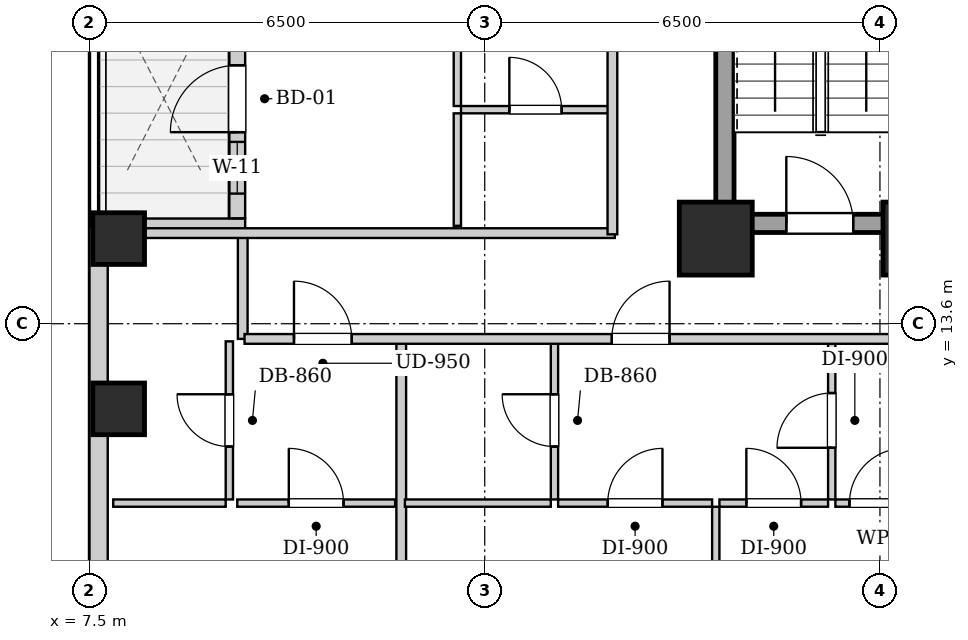
"""IFC4 building model, lengths in metres.
Left out: names, types, materials, properties, quantities, classifications, styles, units other than length and angle.
Written with IfcOpenShell. Run it as: python <this file> out.ifc"""

import sys

from ifc_helpers import new_model, si_unit, direction, frame, frame_2d, origin, origin_2d, place, context, subcontext, project, spatial, rectangle, extrude, element, fill, save


model = new_model("IFC4")
c1 = context("Model", 3, precision=1e-05, world=origin(), true_north=direction((0.0, 1.0)))
c2 = subcontext(c1, "Body", "Model", "MODEL_VIEW")
j1 = project(units=[si_unit("LENGTHUNIT", "METRE"), si_unit("PLANEANGLEUNIT", "RADIAN")], contexts=[c1])
p1 = place(None, origin())
s1 = spatial("IfcSite", under=j1, at=p1, CompositionType="ELEMENT")
p2 = place(p1, origin())
s2 = spatial("IfcBuilding", under=s1, at=p2, CompositionType="ELEMENT")
p3 = place(p2, frame((0.0, 0.0, 57.8)))
s3 = spatial("IfcBuildingStorey", under=s2, at=p3, CompositionType="ELEMENT", Elevation=57.8)
for number, where, z_axis, x_axis in (
    (1, (7.98, 12.2, 0.0), (0.0, 0.0, 1.0), (1.0, 0.0, 0.0)),
    (2, (7.98, 15.0, 0.0), (0.0, 0.0, 1.0), (1.0, 0.0, 0.0)),
):
    element("IfcColumn", number, at=place(p3, frame(where, z_axis=z_axis, x_axis=x_axis)), inside=s3, PredefinedType="COLUMN", context=c2, shape_type="SweptSolid", body=[
        extrude(rectangle(XDim=0.85, YDim=0.85, at=origin_2d()), origin(), (0.0, 0.0, 1.0), 3.2),
    ])
for number, where, z_axis, x_axis in (
    (3, (17.8, 15.0, 0.0), (0.0, 0.0, 1.0), (1.0, 0.0, 0.0)),
    (4, (21.15, 15.0, 0.0), (0.0, 0.0, 1.0), (1.0, 0.0, 0.0)),
):
    element("IfcColumn", number, at=place(p3, frame(where, z_axis=z_axis, x_axis=x_axis)), inside=s3, PredefinedType="COLUMN", context=c2, shape_type="SweptSolid", body=[
        extrude(rectangle(XDim=1.2, YDim=1.2, at=origin_2d()), origin(), (0.0, 0.0, 1.0), 3.2),
    ])
p4 = place(p3, frame((7.65, 2.5, 0.0), z_axis=(0.0, 0.0, 1.0), x_axis=(0.0, 1.0, 0.0)))
e5 = element("IfcWall", 5, at=p4, inside=s3, PredefinedType="SOLIDWALL", context=c2, shape_type="SweptSolid", body=[
    extrude(rectangle(XDim=12.7, YDim=0.3, at=frame_2d((6.35, 0.0))), origin(), (0.0, 0.0, 1.0), 1.975),
])
p5 = place(p4, frame((3.257, 0.0, 0.55)))
e6 = element("IfcOpeningElement", 6, at=p5, cuts=e5, PredefinedType="OPENING", context=c2, shape_type="SweptSolid", body=[
    extrude(rectangle(XDim=1.8, YDim=1.2, at=frame_2d((0.9, 0.6))), frame((0.0, 0.16, 0.0), z_axis=(0.0, -1.0, 0.0), x_axis=(1.0, 0.0, 0.0)), (0.0, 0.0, 1.0), 0.32),
])
p6 = place(p4, frame((1.185, 0.0, 0.55)))
e7 = element("IfcOpeningElement", 7, at=p6, cuts=e5, PredefinedType="OPENING", context=c2, shape_type="SweptSolid", body=[
    extrude(rectangle(XDim=1.35, YDim=1.2, at=frame_2d((0.675, 0.6))), frame((0.0, 0.16, 0.0), z_axis=(0.0, -1.0, 0.0), x_axis=(1.0, 0.0, 0.0)), (0.0, 0.0, 1.0), 0.32),
])
p7 = place(p3, frame((7.66, 15.2, 0.0), z_axis=(0.0, 0.0, 1.0), x_axis=(1.0, 0.0, 0.0)))
e8 = element("IfcWall", 8, at=p7, inside=s3, PredefinedType="SOLIDWALL", context=c2, shape_type="SweptSolid", body=[
    extrude(rectangle(XDim=2.4, YDim=0.26, at=frame_2d((1.2, 0.0))), origin(), (0.0, 0.0, 1.0), 2.94),
])
p8 = place(p3, frame((9.93, 15.334, 0.0), z_axis=(0.0, 0.0, 1.0), x_axis=(0.0, 1.0, 0.0)))
e9 = element("IfcWall", 9, at=p8, inside=s3, PredefinedType="SOLIDWALL", context=c2, shape_type="SweptSolid", body=[
    extrude(rectangle(XDim=3.932, YDim=0.26, at=frame_2d((1.966, 0.0))), origin(), (0.0, 0.0, 1.0), 2.94),
])
p9 = place(p8, frame((1.416, 0.0, 0.0)))
e10 = element("IfcOpeningElement", 10, at=p9, cuts=e9, PredefinedType="OPENING", context=c2, shape_type="SweptSolid", body=[
    extrude(rectangle(XDim=1.1, YDim=2.0, at=frame_2d((0.55, 1.0))), frame((0.0, 0.14, 0.0), z_axis=(0.0, -1.0, 0.0), x_axis=(1.0, 0.0, 0.0)), (0.0, 0.0, 1.0), 0.28),
])
p10 = place(p8, frame((0.406, 0.0, 0.55)))
e11 = element("IfcOpeningElement", 11, at=p10, cuts=e9, PredefinedType="OPENING", context=c2, shape_type="SweptSolid", body=[
    extrude(rectangle(XDim=0.85, YDim=1.2, at=frame_2d((0.425, 0.6))), frame((0.0, 0.14, 0.0), z_axis=(0.0, -1.0, 0.0), x_axis=(1.0, 0.0, 0.0)), (0.0, 0.0, 1.0), 0.28),
])
p11 = place(p3, frame((17.95, 15.1, 0.0), z_axis=(0.0, 0.0, 1.0), x_axis=(0.0, 1.0, 0.0)))
e12 = element("IfcWall", 12, at=p11, inside=s3, PredefinedType="SHEAR", context=c2, shape_type="SweptSolid", body=[
    extrude(rectangle(XDim=9.0, YDim=0.3, at=frame_2d((4.5, 0.0))), origin(), (0.0, 0.0, 1.0), 2.94),
])
p12 = place(p3, frame((18.1, 15.25, 0.0), z_axis=(0.0, 0.0, 1.0), x_axis=(1.0, 0.0, 0.0)))
e13 = element("IfcWall", 13, at=p12, inside=s3, PredefinedType="SHEAR", context=c2, shape_type="SweptSolid", body=[
    extrude(rectangle(XDim=2.85, YDim=0.3, at=frame_2d((1.425, 0.0))), origin(), (0.0, 0.0, 1.0), 2.94),
])
p13 = place(p12, frame((0.86, 0.0, 0.0)))
e14 = element("IfcOpeningElement", 14, at=p13, cuts=e13, PredefinedType="OPENING", context=c2, shape_type="SweptSolid", body=[
    extrude(rectangle(XDim=1.1, YDim=2.05, at=frame_2d((0.55, 1.025))), frame((0.0, 0.16, 0.0), z_axis=(0.0, -1.0, 0.0), x_axis=(1.0, 0.0, 0.0)), (0.0, 0.0, 1.0), 0.32),
])
p14 = place(p3, frame((10.02, 13.35, 0.0), z_axis=(0.0, 0.0, 1.0), x_axis=(0.0, 1.0, 0.0)))
e15 = element("IfcWall", 15, at=p14, inside=s3, PredefinedType="PARTITIONING", context=c2, shape_type="SweptSolid", body=[
    extrude(rectangle(XDim=1.74, YDim=0.16, at=frame_2d((0.87, 0.0))), origin(), (0.0, 0.0, 1.0), 2.94),
])
p15 = place(p3, frame((7.78, 15.09, 0.0), z_axis=(0.0, 0.0, 1.0), x_axis=(1.0, 0.0, 0.0)))
e16 = element("IfcWall", 16, at=p15, inside=s3, PredefinedType="PARTITIONING", context=c2, shape_type="SweptSolid", body=[
    extrude(rectangle(XDim=8.36, YDim=0.16, at=frame_2d((4.18, 0.0))), origin(), (0.0, 0.0, 1.0), 2.232),
])
p16 = place(p3, frame((9.8, 10.71, 0.0), z_axis=(0.0, 0.0, 1.0), x_axis=(0.0, 1.0, 0.0)))
e17 = element("IfcWall", 17, at=p16, inside=s3, PredefinedType="PARTITIONING", context=c2, shape_type="SweptSolid", body=[
    extrude(rectangle(XDim=2.6, YDim=0.12, at=frame_2d((1.3, 0.0))), origin(), (0.0, 0.0, 1.0), 2.94),
])
p17 = place(p16, frame((0.87, 0.0, 0.0)))
e18 = element("IfcOpeningElement", 18, at=p17, cuts=e17, PredefinedType="OPENING", context=c2, shape_type="SweptSolid", body=[
    extrude(rectangle(XDim=0.86, YDim=2.05, at=frame_2d((0.43, 1.025))), frame((0.0, 0.07, 0.0), z_axis=(0.0, -1.0, 0.0), x_axis=(1.0, 0.0, 0.0)), (0.0, 0.0, 1.0), 0.14),
])
p18 = place(p3, frame((7.89, 10.65, 0.0), z_axis=(0.0, 0.0, 1.0), x_axis=(1.0, 0.0, 0.0)))
e19 = element("IfcWall", 19, at=p18, inside=s3, PredefinedType="PARTITIONING", context=c2, shape_type="SweptSolid", body=[
    extrude(rectangle(XDim=1.85, YDim=0.12, at=frame_2d((0.925, 0.0))), origin(), (0.0, 0.0, 1.0), 2.94),
])
p19 = place(p3, frame((9.93, 10.65, 0.0), z_axis=(0.0, 0.0, 1.0), x_axis=(1.0, 0.0, 0.0)))
e20 = element("IfcWall", 20, at=p19, inside=s3, PredefinedType="PARTITIONING", context=c2, shape_type="SweptSolid", body=[
    extrude(rectangle(XDim=2.597, YDim=0.12, at=frame_2d((1.299, 0.0))), origin(), (0.0, 0.0, 1.0), 2.94),
])
p20 = place(p19, frame((0.848, 0.0, 0.0)))
e21 = element("IfcOpeningElement", 21, at=p20, cuts=e20, PredefinedType="OPENING", context=c2, shape_type="SweptSolid", body=[
    extrude(rectangle(XDim=0.9, YDim=2.05, at=frame_2d((0.45, 1.025))), frame((0.0, 0.07, 0.0), z_axis=(0.0, -1.0, 0.0), x_axis=(1.0, 0.0, 0.0)), (0.0, 0.0, 1.0), 0.14),
])
p21 = place(p3, frame((12.627, 2.26, 0.0), z_axis=(0.0, 0.0, 1.0), x_axis=(0.0, 1.0, 0.0)))
e22 = element("IfcWall", 22, at=p21, inside=s3, PredefinedType="PARTITIONING", context=c2, shape_type="SweptSolid", body=[
    extrude(rectangle(XDim=11.05, YDim=0.16, at=frame_2d((5.525, 0.0))), origin(), (0.0, 0.0, 1.0), 2.94),
])
p22 = place(p3, frame((15.147, 10.71, 0.0), z_axis=(0.0, 0.0, 1.0), x_axis=(0.0, 1.0, 0.0)))
e23 = element("IfcWall", 23, at=p22, inside=s3, PredefinedType="PARTITIONING", context=c2, shape_type="SweptSolid", body=[
    extrude(rectangle(XDim=2.6, YDim=0.12, at=frame_2d((1.3, 0.0))), origin(), (0.0, 0.0, 1.0), 2.94),
])
p23 = place(p22, frame((0.87, 0.0, 0.0)))
e24 = element("IfcOpeningElement", 24, at=p23, cuts=e23, PredefinedType="OPENING", context=c2, shape_type="SweptSolid", body=[
    extrude(rectangle(XDim=0.86, YDim=2.05, at=frame_2d((0.43, 1.025))), frame((0.0, 0.07, 0.0), z_axis=(0.0, -1.0, 0.0), x_axis=(1.0, 0.0, 0.0)), (0.0, 0.0, 1.0), 0.14),
])
p24 = place(p3, frame((12.687, 10.65, 0.0), z_axis=(0.0, 0.0, 1.0), x_axis=(1.0, 0.0, 0.0)))
e25 = element("IfcWall", 25, at=p24, inside=s3, PredefinedType="PARTITIONING", context=c2, shape_type="SweptSolid", body=[
    extrude(rectangle(XDim=2.4, YDim=0.12, at=frame_2d((1.2, 0.0))), origin(), (0.0, 0.0, 1.0), 2.94),
])
p25 = place(p3, frame((19.707, 10.71, 0.0), z_axis=(0.0, 0.0, 1.0), x_axis=(0.0, 1.0, 0.0)))
e26 = element("IfcWall", 26, at=p25, inside=s3, PredefinedType="PARTITIONING", context=c2, shape_type="SweptSolid", body=[
    extrude(rectangle(XDim=2.6, YDim=0.12, at=frame_2d((1.3, 0.0))), origin(), (0.0, 0.0, 1.0), 2.94),
])
p26 = place(p25, frame((0.85, 0.0, 0.0)))
e27 = element("IfcOpeningElement", 27, at=p26, cuts=e26, PredefinedType="OPENING", context=c2, shape_type="SweptSolid", body=[
    extrude(rectangle(XDim=0.9, YDim=2.05, at=frame_2d((0.45, 1.025))), frame((0.0, 0.07, 0.0), z_axis=(0.0, -1.0, 0.0), x_axis=(1.0, 0.0, 0.0)), (0.0, 0.0, 1.0), 0.14),
])
p27 = place(p3, frame((15.207, 10.65, 0.0), z_axis=(0.0, 0.0, 1.0), x_axis=(1.0, 0.0, 0.0)))
e28 = element("IfcWall", 28, at=p27, inside=s3, PredefinedType="PARTITIONING", context=c2, shape_type="SweptSolid", body=[
    extrude(rectangle(XDim=2.533, YDim=0.12, at=frame_2d((1.267, 0.0))), origin(), (0.0, 0.0, 1.0), 2.94),
])
p28 = place(p27, frame((0.816, 0.0, 0.0)))
e29 = element("IfcOpeningElement", 29, at=p28, cuts=e28, PredefinedType="OPENING", context=c2, shape_type="SweptSolid", body=[
    extrude(rectangle(XDim=0.9, YDim=2.05, at=frame_2d((0.45, 1.025))), frame((0.0, 0.07, 0.0), z_axis=(0.0, -1.0, 0.0), x_axis=(1.0, 0.0, 0.0)), (0.0, 0.0, 1.0), 0.14),
])
p29 = place(p3, frame((17.86, 10.65, 0.0), z_axis=(0.0, 0.0, 1.0), x_axis=(1.0, 0.0, 0.0)))
e30 = element("IfcWall", 30, at=p29, inside=s3, PredefinedType="PARTITIONING", context=c2, shape_type="SweptSolid", body=[
    extrude(rectangle(XDim=1.787, YDim=0.12, at=frame_2d((0.894, 0.0))), origin(), (0.0, 0.0, 1.0), 2.94),
])
p30 = place(p29, frame((0.443, 0.0, 0.0)))
e31 = element("IfcOpeningElement", 31, at=p30, cuts=e30, PredefinedType="OPENING", context=c2, shape_type="SweptSolid", body=[
    extrude(rectangle(XDim=0.9, YDim=2.05, at=frame_2d((0.45, 1.025))), frame((0.0, 0.07, 0.0), z_axis=(0.0, -1.0, 0.0), x_axis=(1.0, 0.0, 0.0)), (0.0, 0.0, 1.0), 0.14),
])
p31 = place(p3, frame((19.767, 10.65, 0.0), z_axis=(0.0, 0.0, 1.0), x_axis=(1.0, 0.0, 0.0)))
e32 = element("IfcWall", 32, at=p31, inside=s3, PredefinedType="PARTITIONING", context=c2, shape_type="SweptSolid", body=[
    extrude(rectangle(XDim=1.364, YDim=0.12, at=frame_2d((0.682, 0.0))), origin(), (0.0, 0.0, 1.0), 2.94),
])
p32 = place(p31, frame((0.232, 0.0, 0.0)))
e33 = element("IfcOpeningElement", 33, at=p32, cuts=e32, PredefinedType="OPENING", context=c2, shape_type="SweptSolid", body=[
    extrude(rectangle(XDim=0.9, YDim=2.05, at=frame_2d((0.45, 1.025))), frame((0.0, 0.07, 0.0), z_axis=(0.0, -1.0, 0.0), x_axis=(1.0, 0.0, 0.0)), (0.0, 0.0, 1.0), 0.14),
])
p33 = place(p3, frame((17.8, 0.28, 0.0), z_axis=(0.0, 0.0, 1.0), x_axis=(0.0, 1.0, 0.0)))
e34 = element("IfcWall", 34, at=p33, inside=s3, PredefinedType="PARTITIONING", context=c2, shape_type="SweptSolid", body=[
    extrude(rectangle(XDim=10.31, YDim=0.12, at=frame_2d((5.155, 0.0))), origin(), (0.0, 0.0, 1.0), 2.232),
])
p34 = place(p33, frame((4.69, 0.0, 0.0)))
e35 = element("IfcOpeningElement", 35, at=p34, cuts=e34, PredefinedType="OPENING", context=c2, shape_type="SweptSolid", body=[
    extrude(rectangle(XDim=0.9, YDim=2.05, at=frame_2d((0.45, 1.025))), frame((0.0, 0.07, 0.0), z_axis=(0.0, -1.0, 0.0), x_axis=(1.0, 0.0, 0.0)), (0.0, 0.0, 1.0), 0.14),
])
p35 = place(p3, frame((13.61, 17.12, 0.0), z_axis=(0.0, 0.0, 1.0), x_axis=(1.0, 0.0, 0.0)))
e36 = element("IfcWall", 36, at=p35, inside=s3, PredefinedType="PARTITIONING", context=c2, shape_type="SweptSolid", body=[
    extrude(rectangle(XDim=2.45, YDim=0.12, at=frame_2d((1.225, 0.0))), origin(), (0.0, 0.0, 1.0), 2.94),
])
p36 = place(p35, frame((0.795, 0.0, 0.0)))
e37 = element("IfcOpeningElement", 37, at=p36, cuts=e36, PredefinedType="OPENING", context=c2, shape_type="SweptSolid", body=[
    extrude(rectangle(XDim=0.86, YDim=2.05, at=frame_2d((0.43, 1.025))), frame((0.0, 0.07, 0.0), z_axis=(0.0, -1.0, 0.0), x_axis=(1.0, 0.0, 0.0)), (0.0, 0.0, 1.0), 0.14),
])
p37 = place(p3, frame((13.55, 15.21, 0.0), z_axis=(0.0, 0.0, 1.0), x_axis=(0.0, 1.0, 0.0)))
e38 = element("IfcWall", 38, at=p37, inside=s3, PredefinedType="PARTITIONING", context=c2, shape_type="SweptSolid", body=[
    extrude(rectangle(XDim=1.85, YDim=0.12, at=frame_2d((0.925, 0.0))), origin(), (0.0, 0.0, 1.0), 2.94),
])
p38 = place(p3, frame((13.55, 17.18, 0.0), z_axis=(0.0, 0.0, 1.0), x_axis=(0.0, 1.0, 0.0)))
e39 = element("IfcWall", 39, at=p38, inside=s3, PredefinedType="PARTITIONING", context=c2, shape_type="SweptSolid", body=[
    extrude(rectangle(XDim=3.946, YDim=0.12, at=frame_2d((1.973, 0.0))), origin(), (0.0, 0.0, 1.0), 2.94),
])
p39 = place(p38, frame((1.523, 0.0, 0.0)))
e40 = element("IfcOpeningElement", 40, at=p39, cuts=e39, PredefinedType="OPENING", context=c2, shape_type="SweptSolid", body=[
    extrude(rectangle(XDim=0.9, YDim=2.05, at=frame_2d((0.45, 1.025))), frame((0.0, 0.07, 0.0), z_axis=(0.0, -1.0, 0.0), x_axis=(1.0, 0.0, 0.0)), (0.0, 0.0, 1.0), 0.14),
])
p40 = place(p3, frame((10.05, 13.35, 0.0), z_axis=(0.0, 0.0, 1.0), x_axis=(1.0, 0.0, 0.0)))
e41 = element("IfcWall", 41, at=p40, inside=s3, PredefinedType="PARTITIONING", context=c2, shape_type="SweptSolid", body=[
    extrude(rectangle(XDim=33.9, YDim=0.16, at=frame_2d((16.95, 0.0))), origin(), (0.0, 0.0, 1.0), 2.94),
])
p41 = place(p40, frame((0.813, 0.0, 0.0)))
e42 = element("IfcOpeningElement", 42, at=p41, cuts=e41, PredefinedType="OPENING", context=c2, shape_type="SweptSolid", body=[
    extrude(rectangle(XDim=0.95, YDim=2.1, at=frame_2d((0.475, 1.05))), frame((0.0, 0.09, 0.0), z_axis=(0.0, -1.0, 0.0), x_axis=(1.0, 0.0, 0.0)), (0.0, 0.0, 1.0), 0.18),
])
p42 = place(p40, frame((6.04, 0.0, 0.0)))
e43 = element("IfcOpeningElement", 43, at=p42, cuts=e41, PredefinedType="OPENING", context=c2, shape_type="SweptSolid", body=[
    extrude(rectangle(XDim=0.95, YDim=2.1, at=frame_2d((0.475, 1.05))), frame((0.0, 0.09, 0.0), z_axis=(0.0, -1.0, 0.0), x_axis=(1.0, 0.0, 0.0)), (0.0, 0.0, 1.0), 0.18),
])
p43 = place(p40, frame((18.09, 0.0, 0.0)))
e44 = element("IfcOpeningElement", 44, at=p43, cuts=e41, PredefinedType="OPENING", context=c2, shape_type="SweptSolid", body=[
    extrude(rectangle(XDim=0.95, YDim=2.1, at=frame_2d((0.475, 1.05))), frame((0.0, 0.09, 0.0), z_axis=(0.0, -1.0, 0.0), x_axis=(1.0, 0.0, 0.0)), (0.0, 0.0, 1.0), 0.18),
])
p44 = place(p40, frame((25.962, 0.0, 0.0)))
e45 = element("IfcOpeningElement", 45, at=p44, cuts=e41, PredefinedType="OPENING", context=c2, shape_type="SweptSolid", body=[
    extrude(rectangle(XDim=0.95, YDim=2.1, at=frame_2d((0.475, 1.05))), frame((0.0, 0.09, 0.0), z_axis=(0.0, -1.0, 0.0), x_axis=(1.0, 0.0, 0.0)), (0.0, 0.0, 1.0), 0.18),
])
p45 = place(p3, frame((16.1, 15.07, 0.0), z_axis=(0.0, 0.0, 1.0), x_axis=(0.0, 1.0, 0.0)))
e46 = element("IfcWall", 46, at=p45, inside=s3, PredefinedType="PARTITIONING", context=c2, shape_type="SweptSolid", body=[
    extrude(rectangle(XDim=13.93, YDim=0.16, at=frame_2d((6.965, 0.0))), origin(), (0.0, 0.0, 1.0), 2.94),
])
p46 = place(p45, frame((3.608, 0.0, 0.0)))
e47 = element("IfcOpeningElement", 47, at=p46, cuts=e46, PredefinedType="OPENING", context=c2, shape_type="SweptSolid", body=[
    extrude(rectangle(XDim=0.95, YDim=2.1, at=frame_2d((0.475, 1.05))), frame((0.0, 0.09, 0.0), z_axis=(0.0, -1.0, 0.0), x_axis=(1.0, 0.0, 0.0)), (0.0, 0.0, 1.0), 0.18),
])
p47 = place(p45, frame((10.649, 0.0, 0.0)))
e48 = element("IfcOpeningElement", 48, at=p47, cuts=e46, PredefinedType="OPENING", context=c2, shape_type="SweptSolid", body=[
    extrude(rectangle(XDim=0.95, YDim=2.1, at=frame_2d((0.475, 1.05))), frame((0.0, 0.09, 0.0), z_axis=(0.0, -1.0, 0.0), x_axis=(1.0, 0.0, 0.0)), (0.0, 0.0, 1.0), 0.18),
])
p48 = place(p13, origin())
e49 = element("IfcDoor", 49, at=p48, inside=s3, OperationType="SINGLE_SWING_LEFT", PredefinedType="DOOR", context=c2, shape_type="SweptSolid", body=[
    extrude(rectangle(XDim=1.1, YDim=2.05, at=frame_2d((0.55, 1.025))), frame((0.0, 0.025, 0.0), z_axis=(0.0, -1.0, 0.0), x_axis=(1.0, 0.0, 0.0)), (0.0, 0.0, 1.0), 0.05),
])
fill(e14, e49)
p49 = place(p17, origin())
e50 = element("IfcDoor", 50, at=p49, inside=s3, OperationType="SINGLE_SWING_RIGHT", PredefinedType="DOOR", context=c2, shape_type="SweptSolid", body=[
    extrude(rectangle(XDim=0.86, YDim=2.05, at=frame_2d((0.43, 1.025))), frame((0.0, 0.025, 0.0), z_axis=(0.0, -1.0, 0.0), x_axis=(1.0, 0.0, 0.0)), (0.0, 0.0, 1.0), 0.05),
])
fill(e18, e50)
p50 = place(p20, origin())
e51 = element("IfcDoor", 51, at=p50, inside=s3, OperationType="SINGLE_SWING_LEFT", PredefinedType="DOOR", context=c2, shape_type="SweptSolid", body=[
    extrude(rectangle(XDim=0.9, YDim=2.05, at=frame_2d((0.45, 1.025))), frame((0.0, 0.025, 0.0), z_axis=(0.0, -1.0, 0.0), x_axis=(1.0, 0.0, 0.0)), (0.0, 0.0, 1.0), 0.05),
])
fill(e21, e51)
p51 = place(p23, origin())
e52 = element("IfcDoor", 52, at=p51, inside=s3, OperationType="SINGLE_SWING_RIGHT", PredefinedType="DOOR", context=c2, shape_type="SweptSolid", body=[
    extrude(rectangle(XDim=0.86, YDim=2.05, at=frame_2d((0.43, 1.025))), frame((0.0, 0.025, 0.0), z_axis=(0.0, -1.0, 0.0), x_axis=(1.0, 0.0, 0.0)), (0.0, 0.0, 1.0), 0.05),
])
fill(e24, e52)
p52 = place(p26, origin())
e53 = element("IfcDoor", 53, at=p52, inside=s3, OperationType="SINGLE_SWING_LEFT", PredefinedType="DOOR", context=c2, shape_type="SweptSolid", body=[
    extrude(rectangle(XDim=0.9, YDim=2.05, at=frame_2d((0.45, 1.025))), frame((0.0, 0.025, 0.0), z_axis=(0.0, -1.0, 0.0), x_axis=(1.0, 0.0, 0.0)), (0.0, 0.0, 1.0), 0.05),
])
fill(e27, e53)
p53 = place(p28, origin())
e54 = element("IfcDoor", 54, at=p53, inside=s3, OperationType="SINGLE_SWING_RIGHT", PredefinedType="DOOR", context=c2, shape_type="SweptSolid", body=[
    extrude(rectangle(XDim=0.9, YDim=2.05, at=frame_2d((0.45, 1.025))), frame((0.0, 0.025, 0.0), z_axis=(0.0, -1.0, 0.0), x_axis=(1.0, 0.0, 0.0)), (0.0, 0.0, 1.0), 0.05),
])
fill(e29, e54)
p54 = place(p30, origin())
e55 = element("IfcDoor", 55, at=p54, inside=s3, OperationType="SINGLE_SWING_LEFT", PredefinedType="DOOR", context=c2, shape_type="SweptSolid", body=[
    extrude(rectangle(XDim=0.9, YDim=2.05, at=frame_2d((0.45, 1.025))), frame((0.0, 0.025, 0.0), z_axis=(0.0, -1.0, 0.0), x_axis=(1.0, 0.0, 0.0)), (0.0, 0.0, 1.0), 0.05),
])
fill(e31, e55)
p55 = place(p32, origin())
e56 = element("IfcDoor", 56, at=p55, inside=s3, OperationType="SINGLE_SWING_RIGHT", PredefinedType="DOOR", context=c2, shape_type="SweptSolid", body=[
    extrude(rectangle(XDim=0.9, YDim=2.05, at=frame_2d((0.45, 1.025))), frame((0.0, 0.025, 0.0), z_axis=(0.0, -1.0, 0.0), x_axis=(1.0, 0.0, 0.0)), (0.0, 0.0, 1.0), 0.05),
])
fill(e33, e56)
p56 = place(p36, origin())
e57 = element("IfcDoor", 57, at=p56, inside=s3, OperationType="SINGLE_SWING_LEFT", PredefinedType="DOOR", context=c2, shape_type="SweptSolid", body=[
    extrude(rectangle(XDim=0.86, YDim=2.05, at=frame_2d((0.43, 1.025))), frame((0.0, 0.025, 0.0), z_axis=(0.0, -1.0, 0.0), x_axis=(1.0, 0.0, 0.0)), (0.0, 0.0, 1.0), 0.05),
])
fill(e37, e57)
p57 = place(p41, origin())
e58 = element("IfcDoor", 58, at=p57, inside=s3, OperationType="SINGLE_SWING_LEFT", PredefinedType="DOOR", context=c2, shape_type="SweptSolid", body=[
    extrude(rectangle(XDim=0.95, YDim=2.1, at=frame_2d((0.475, 1.05))), frame((0.0, 0.025, 0.0), z_axis=(0.0, -1.0, 0.0), x_axis=(1.0, 0.0, 0.0)), (0.0, 0.0, 1.0), 0.05),
])
fill(e42, e58)
p58 = place(p42, origin())
e59 = element("IfcDoor", 59, at=p58, inside=s3, OperationType="SINGLE_SWING_RIGHT", PredefinedType="DOOR", context=c2, shape_type="SweptSolid", body=[
    extrude(rectangle(XDim=0.95, YDim=2.1, at=frame_2d((0.475, 1.05))), frame((0.0, 0.025, 0.0), z_axis=(0.0, -1.0, 0.0), x_axis=(1.0, 0.0, 0.0)), (0.0, 0.0, 1.0), 0.05),
])
fill(e43, e59)
p59 = place(p9, origin())
e60 = element("IfcDoor", 60, at=p59, inside=s3, OperationType="SINGLE_SWING_LEFT", PredefinedType="DOOR", context=c2, shape_type="SweptSolid", body=[
    extrude(rectangle(XDim=1.1, YDim=2.0, at=frame_2d((0.55, 1.0))), frame((0.0, 0.025, 0.0), z_axis=(0.0, -1.0, 0.0), x_axis=(1.0, 0.0, 0.0)), (0.0, 0.0, 1.0), 0.05),
])
fill(e10, e60)
p60 = place(p10, origin())
e61 = element("IfcWindow", 61, at=p60, inside=s3, PartitioningType="SINGLE_PANEL", PredefinedType="WINDOW", context=c2, shape_type="SweptSolid", body=[
    extrude(rectangle(XDim=0.85, YDim=1.2, at=frame_2d((0.425, 0.6))), frame((0.0, 0.03, 0.0), z_axis=(0.0, -1.0, 0.0), x_axis=(1.0, 0.0, 0.0)), (0.0, 0.0, 1.0), 0.06),
])
fill(e11, e61)
save(model, sys.argv[1])
